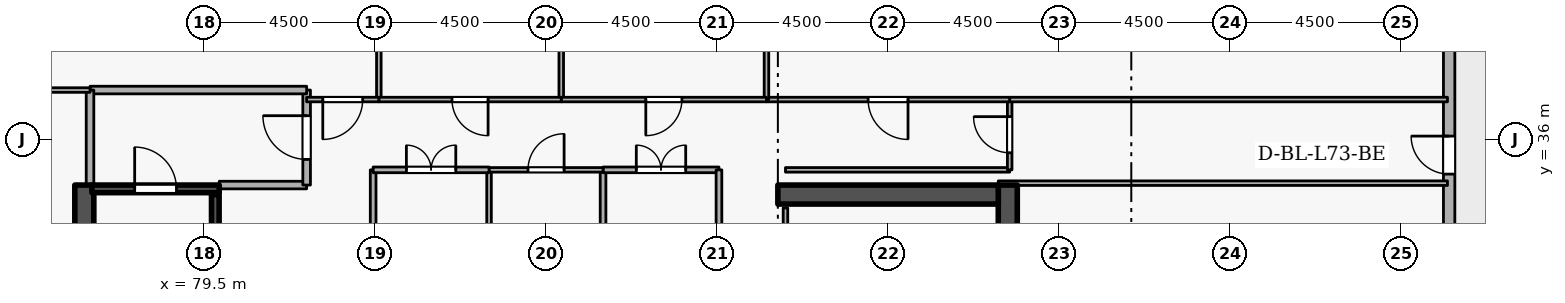
"""IFC4 building model, lengths in metres.
Left out: names, types, materials, properties, quantities, classifications, styles, units other than length and angle.
Written with IfcOpenShell. Run it as: python <this file> out.ifc"""

import sys

from ifc_helpers import new_model, si_unit, direction, frame, frame_2d, origin, place, context, subcontext, project, spatial, rectangle, extrude, element, fill, save


model = new_model("IFC4")
c1 = context("Model", 3, precision=1e-05, world=origin(), true_north=direction((0.0, 1.0)))
c2 = subcontext(c1, "Body", "Model", "MODEL_VIEW")
j1 = project(units=[si_unit("LENGTHUNIT", "METRE"), si_unit("PLANEANGLEUNIT", "RADIAN")], contexts=[c1])
p1 = place(None, origin())
s1 = spatial("IfcSite", under=j1, at=p1, CompositionType="ELEMENT")
p2 = place(p1, origin())
s2 = spatial("IfcBuilding", under=s1, at=p2, CompositionType="ELEMENT")
p3 = place(p2, frame((0.0, 0.0, 272.7)))
s3 = spatial("IfcBuildingStorey", under=s2, at=p3, CompositionType="ELEMENT", Elevation=272.7)
p4 = place(p3, frame((100.65, 19.2, 0.0), z_axis=(0.0, 0.0, 1.0), x_axis=(0.0, 1.0, 0.0)))
e1 = element("IfcWall", 1, at=p4, inside=s3, PredefinedType="SHEAR", context=c2, shape_type="SweptSolid", body=[
    extrude(rectangle(XDim=15.6, YDim=0.5, at=frame_2d((7.8, 0.0))), origin(), (0.0, 0.0, 1.0), 3.6),
])
p5 = place(p3, frame((94.6, 34.55, 0.0), z_axis=(0.0, 0.0, 1.0), x_axis=(1.0, 0.0, 0.0)))
e2 = element("IfcWall", 2, at=p5, inside=s3, PredefinedType="SHEAR", context=c2, shape_type="SweptSolid", body=[
    extrude(rectangle(XDim=5.8, YDim=0.5, at=frame_2d((2.9, 0.0))), origin(), (0.0, 0.0, 1.0), 3.6),
])
p6 = place(p3, frame((76.35, 19.2, 0.0), z_axis=(0.0, 0.0, 1.0), x_axis=(0.0, 1.0, 0.0)))
e3 = element("IfcWall", 3, at=p6, inside=s3, PredefinedType="SHEAR", context=c2, shape_type="SweptSolid", body=[
    extrude(rectangle(XDim=15.6, YDim=0.5, at=frame_2d((7.8, 0.0))), origin(), (0.0, 0.0, 1.0), 3.6),
])
p7 = place(p3, frame((112.264, 12.094, 0.0), z_axis=(0.0, 0.0, 1.0), x_axis=(2.7061402e-05, 0.999999999634, 0.0)))
e4 = element("IfcWall", 4, at=p7, inside=s3, PredefinedType="STANDARD", context=c2, shape_type="SweptSolid", body=[
    extrude(rectangle(XDim=36.087, YDim=0.3, at=frame_2d((18.043, 0.0))), origin(), (0.0, 0.0, 1.0), 2.7),
])
p8 = place(p7, frame((22.993, 0.0, 0.0)))
e5 = element("IfcOpeningElement", 5, at=p8, cuts=e4, PredefinedType="OPENING", context=c2, shape_type="SweptSolid", body=[
    extrude(rectangle(XDim=1.0, YDim=2.08, at=frame_2d((0.5, 1.04))), frame((0.0, 0.16, 0.0), z_axis=(0.0, -1.0, 0.0), x_axis=(1.0, 0.0, 0.0)), (0.0, 0.0, 1.0), 0.32),
])
p9 = place(p7, frame((2.7, 0.0, 0.72)))
e6 = element("IfcOpeningElement", 6, at=p9, cuts=e4, PredefinedType="OPENING", context=c2, shape_type="SweptSolid", body=[
    extrude(rectangle(XDim=0.9, YDim=1.75, at=frame_2d((0.45, 0.875))), frame((0.0, 0.16, 0.0), z_axis=(0.0, -1.0, 0.0), x_axis=(1.0, 0.0, 0.0)), (0.0, 0.0, 1.0), 0.32),
])
p10 = place(p7, frame((7.5, 0.0, 0.72)))
e7 = element("IfcOpeningElement", 7, at=p10, cuts=e4, PredefinedType="OPENING", context=c2, shape_type="SweptSolid", body=[
    extrude(rectangle(XDim=0.9, YDim=1.75, at=frame_2d((0.45, 0.875))), frame((0.0, 0.16, 0.0), z_axis=(0.0, -1.0, 0.0), x_axis=(1.0, 0.0, 0.0)), (0.0, 0.0, 1.0), 0.32),
])
p11 = place(p7, frame((12.3, 0.0, 0.72)))
e8 = element("IfcOpeningElement", 8, at=p11, cuts=e4, PredefinedType="OPENING", context=c2, shape_type="SweptSolid", body=[
    extrude(rectangle(XDim=0.9, YDim=1.75, at=frame_2d((0.45, 0.875))), frame((0.0, 0.16, 0.0), z_axis=(0.0, -1.0, 0.0), x_axis=(1.0, 0.0, 0.0)), (0.0, 0.0, 1.0), 0.32),
])
p12 = place(p7, frame((17.1, 0.0, 0.72)))
e9 = element("IfcOpeningElement", 9, at=p12, cuts=e4, PredefinedType="OPENING", context=c2, shape_type="SweptSolid", body=[
    extrude(rectangle(XDim=0.9, YDim=1.75, at=frame_2d((0.45, 0.875))), frame((0.0, 0.16, 0.0), z_axis=(0.0, -1.0, 0.0), x_axis=(1.0, 0.0, 0.0)), (0.0, 0.0, 1.0), 0.32),
])
p13 = place(p7, frame((26.7, 0.0, 0.72)))
e10 = element("IfcOpeningElement", 10, at=p13, cuts=e4, PredefinedType="OPENING", context=c2, shape_type="SweptSolid", body=[
    extrude(rectangle(XDim=0.9, YDim=1.75, at=frame_2d((0.45, 0.875))), frame((0.0, 0.16, 0.0), z_axis=(0.0, -1.0, 0.0), x_axis=(1.0, 0.0, 0.0)), (0.0, 0.0, 1.0), 0.32),
])
p14 = place(p7, frame((31.5, 0.0, 0.72)))
e11 = element("IfcOpeningElement", 11, at=p14, cuts=e4, PredefinedType="OPENING", context=c2, shape_type="SweptSolid", body=[
    extrude(rectangle(XDim=0.9, YDim=1.75, at=frame_2d((0.45, 0.875))), frame((0.0, 0.16, 0.0), z_axis=(0.0, -1.0, 0.0), x_axis=(1.0, 0.0, 0.0)), (0.0, 0.0, 1.0), 0.32),
])
p15 = place(p3, frame((76.55, 34.7, 0.0), z_axis=(0.0, 0.0, 1.0), x_axis=(1.0, 0.0, 0.0)))
e12 = element("IfcWall", 12, at=p15, inside=s3, PredefinedType="SHEAR", context=c2, shape_type="SweptSolid", body=[
    extrude(rectangle(XDim=3.35, YDim=0.2, at=frame_2d((1.675, 0.0))), origin(), (0.0, 0.0, 1.0), 3.6),
])
p16 = place(p15, frame((1.125, 0.0, 0.0)))
e13 = element("IfcOpeningElement", 13, at=p16, cuts=e12, PredefinedType="OPENING", context=c2, shape_type="SweptSolid", body=[
    extrude(rectangle(XDim=1.1, YDim=2.1, at=frame_2d((0.55, 1.05))), frame((0.0, 0.11, 0.0), z_axis=(0.0, -1.0, 0.0), x_axis=(1.0, 0.0, 0.0)), (0.0, 0.0, 1.0), 0.22),
])
p17 = place(p3, frame((79.797, 27.45, 0.0), z_axis=(0.0, 0.0, 1.0), x_axis=(0.0, 1.0, 0.0)))
e14 = element("IfcWall", 14, at=p17, inside=s3, PredefinedType="SHEAR", context=c2, shape_type="SweptSolid", body=[
    extrude(rectangle(XDim=7.1, YDim=0.2, at=frame_2d((3.55, 0.0))), origin(), (0.0, 0.0, 1.0), 3.6),
])
p18 = place(p3, frame((79.9, 34.8, 0.0), z_axis=(0.0, 0.0, 1.0), x_axis=(1.0, 0.0, 0.0)))
e15 = element("IfcWall", 15, at=p18, inside=s3, PredefinedType="STANDARD", context=c2, shape_type="SweptSolid", body=[
    extrude(rectangle(XDim=2.3, YDim=0.2, at=frame_2d((1.15, 0.0))), origin(), (0.0, 0.0, 1.0), 2.545),
])
p19 = place(p3, frame((82.2, 34.8, 0.0), z_axis=(0.0, 0.0, 1.0), x_axis=(0.0, 1.0, 0.0)))
e16 = element("IfcWall", 16, at=p19, inside=s3, PredefinedType="STANDARD", context=c2, shape_type="SweptSolid", body=[
    extrude(rectangle(XDim=2.5, YDim=0.2, at=frame_2d((1.25, 0.0))), origin(), (0.0, 0.0, 1.0), 3.34),
])
p20 = place(p19, frame((0.675, 0.0, 0.0)))
e17 = element("IfcOpeningElement", 17, at=p20, cuts=e16, PredefinedType="OPENING", context=c2, shape_type="SweptSolid", body=[
    extrude(rectangle(XDim=1.15, YDim=2.1, at=frame_2d((0.575, 1.05))), frame((0.0, 0.11, 0.0), z_axis=(0.0, -1.0, 0.0), x_axis=(1.0, 0.0, 0.0)), (0.0, 0.0, 1.0), 0.22),
])
p21 = place(p3, frame((82.2, 37.3, 0.0), z_axis=(0.0, 0.0, 1.0), x_axis=(-1.0, 0.0, 0.0)))
e18 = element("IfcWall", 18, at=p21, inside=s3, PredefinedType="STANDARD", context=c2, shape_type="SweptSolid", body=[
    extrude(rectangle(XDim=5.7, YDim=0.2, at=frame_2d((2.85, 0.0))), origin(), (0.0, 0.0, 1.0), 3.34),
])
p22 = place(p3, frame((76.5, 37.3, 0.0), z_axis=(0.0, 0.0, 1.0), x_axis=(0.0, -1.0, 0.0)))
e19 = element("IfcWall", 19, at=p22, inside=s3, PredefinedType="STANDARD", context=c2, shape_type="SweptSolid", body=[
    extrude(rectangle(XDim=2.5, YDim=0.2, at=frame_2d((1.25, 0.0))), origin(), (0.0, 0.0, 1.0), 3.34),
])
p23 = place(p3, frame((94.8, 32.1, 0.0), z_axis=(0.0, 0.0, 1.0), x_axis=(0.0, 1.0, 0.0)))
e20 = element("IfcWall", 20, at=p23, inside=s3, PredefinedType="PARTITIONING", context=c2, shape_type="SweptSolid", body=[
    extrude(rectangle(XDim=2.1, YDim=0.12, at=frame_2d((1.05, 0.0))), origin(), (0.0, 0.0, 1.0), 3.34),
])
p24 = place(p23, frame((0.575, 0.0, 0.0)))
e21 = element("IfcOpeningElement", 21, at=p24, cuts=e20, PredefinedType="OPENING", context=c2, shape_type="SweptSolid", body=[
    extrude(rectangle(XDim=0.95, YDim=2.1, at=frame_2d((0.475, 1.05))), frame((0.0, 0.07, 0.0), z_axis=(0.0, -1.0, 0.0), x_axis=(1.0, 0.0, 0.0)), (0.0, 0.0, 1.0), 0.14),
])
p25 = place(p3, frame((94.8, 35.2, 0.0), z_axis=(0.0, 0.0, 1.0), x_axis=(1.0, 0.0, 0.0)))
e22 = element("IfcWall", 22, at=p25, inside=s3, PredefinedType="PARTITIONING", context=c2, shape_type="SweptSolid", body=[
    extrude(rectangle(XDim=5.9, YDim=0.12, at=frame_2d((2.95, 0.0))), origin(), (0.0, 0.0, 1.0), 3.34),
])
p26 = place(p3, frame((100.7, 35.2, 0.0), z_axis=(0.0, 0.0, 1.0), x_axis=(0.0, 1.0, 0.0)))
e23 = element("IfcWall", 23, at=p26, inside=s3, PredefinedType="PARTITIONING", context=c2, shape_type="SweptSolid", body=[
    extrude(rectangle(XDim=1.85, YDim=0.12, at=frame_2d((0.925, 0.0))), origin(), (0.0, 0.0, 1.0), 3.34),
])
p27 = place(p26, frame((0.45, 0.0, 0.0)))
e24 = element("IfcOpeningElement", 24, at=p27, cuts=e23, PredefinedType="OPENING", context=c2, shape_type="SweptSolid", body=[
    extrude(rectangle(XDim=0.95, YDim=2.1, at=frame_2d((0.475, 1.05))), frame((0.0, 0.07, 0.0), z_axis=(0.0, -1.0, 0.0), x_axis=(1.0, 0.0, 0.0)), (0.0, 0.0, 1.0), 0.14),
])
p28 = place(p3, frame((100.7, 37.05, 0.0), z_axis=(0.0, 0.0, 1.0), x_axis=(1.0, 0.0, 0.0)))
e25 = element("IfcWall", 25, at=p28, inside=s3, PredefinedType="PARTITIONING", context=c2, shape_type="SweptSolid", body=[
    extrude(rectangle(XDim=11.52, YDim=0.12, at=frame_2d((5.76, 0.0))), origin(), (0.0, 0.0, 1.0), 3.34),
])
p29 = place(p3, frame((112.22, 34.85, 0.0), z_axis=(0.0, 0.0, 1.0), x_axis=(-1.0, 0.0, 0.0)))
e26 = element("IfcWall", 26, at=p29, inside=s3, PredefinedType="PARTITIONING", context=c2, shape_type="SweptSolid", body=[
    extrude(rectangle(XDim=11.82, YDim=0.12, at=frame_2d((5.91, 0.0))), origin(), (0.0, 0.0, 1.0), 2.545),
])
p30 = place(p3, frame((100.7, 37.05, 0.0), z_axis=(0.0, 0.0, 1.0), x_axis=(-1.0, 0.0, 0.0)))
e27 = element("IfcWall", 27, at=p30, inside=s3, PredefinedType="PARTITIONING", context=c2, shape_type="SweptSolid", body=[
    extrude(rectangle(XDim=6.4, YDim=0.12, at=frame_2d((3.2, 0.0))), origin(), (0.0, 0.0, 1.0), 3.34),
])
p31 = place(p30, frame((2.675, 0.0, 0.0)))
e28 = element("IfcOpeningElement", 28, at=p31, cuts=e27, PredefinedType="OPENING", context=c2, shape_type="SweptSolid", body=[
    extrude(rectangle(XDim=1.05, YDim=2.1, at=frame_2d((0.525, 1.05))), frame((0.0, 0.07, 0.0), z_axis=(0.0, -1.0, 0.0), x_axis=(1.0, 0.0, 0.0)), (0.0, 0.0, 1.0), 0.14),
])
for number, where, z_axis, x_axis in (
    (29, (94.3, 37.05, 0.0), (0.0, 0.0, 1.0), (0.0, 1.0, 0.0)),
    (30, (88.9, 37.05, 0.0), (0.0, 0.0, 1.0), (0.0, 1.0, 0.0)),
):
    element("IfcWall", number, at=place(p3, frame(where, z_axis=z_axis, x_axis=x_axis)), inside=s3, PredefinedType="PARTITIONING", context=c2, shape_type="SweptSolid", body=[
        extrude(rectangle(XDim=13.67, YDim=0.12, at=frame_2d((6.835, 0.0))), origin(), (0.0, 0.0, 1.0), 3.34),
    ])
p32 = place(p3, frame((94.3, 37.05, 0.0), z_axis=(0.0, 0.0, 1.0), x_axis=(-1.0, 0.0, 0.0)))
e31 = element("IfcWall", 31, at=p32, inside=s3, PredefinedType="PARTITIONING", context=c2, shape_type="SweptSolid", body=[
    extrude(rectangle(XDim=5.4, YDim=0.12, at=frame_2d((2.7, 0.0))), origin(), (0.0, 0.0, 1.0), 3.34),
])
p33 = place(p32, frame((2.225, 0.0, 0.0)))
e32 = element("IfcOpeningElement", 32, at=p33, cuts=e31, PredefinedType="OPENING", context=c2, shape_type="SweptSolid", body=[
    extrude(rectangle(XDim=0.95, YDim=2.1, at=frame_2d((0.475, 1.05))), frame((0.0, 0.07, 0.0), z_axis=(0.0, -1.0, 0.0), x_axis=(1.0, 0.0, 0.0)), (0.0, 0.0, 1.0), 0.14),
])
p34 = place(p3, frame((84.1, 37.05, 0.0), z_axis=(0.0, 0.0, 1.0), x_axis=(0.0, 1.0, 0.0)))
e33 = element("IfcWall", 33, at=p34, inside=s3, PredefinedType="PARTITIONING", context=c2, shape_type="SweptSolid", body=[
    extrude(rectangle(XDim=13.67, YDim=0.12, at=frame_2d((6.835, 0.0))), origin(), (0.0, 0.0, 1.0), 3.34),
])
p35 = place(p3, frame((88.9, 37.05, 0.0), z_axis=(0.0, 0.0, 1.0), x_axis=(-1.0, 0.0, 0.0)))
e34 = element("IfcWall", 34, at=p35, inside=s3, PredefinedType="PARTITIONING", context=c2, shape_type="SweptSolid", body=[
    extrude(rectangle(XDim=4.8, YDim=0.12, at=frame_2d((2.4, 0.0))), origin(), (0.0, 0.0, 1.0), 3.34),
])
p36 = place(p35, frame((1.925, 0.0, 0.0)))
e35 = element("IfcOpeningElement", 35, at=p36, cuts=e34, PredefinedType="OPENING", context=c2, shape_type="SweptSolid", body=[
    extrude(rectangle(XDim=0.95, YDim=2.1, at=frame_2d((0.475, 1.05))), frame((0.0, 0.07, 0.0), z_axis=(0.0, -1.0, 0.0), x_axis=(1.0, 0.0, 0.0)), (0.0, 0.0, 1.0), 0.14),
])
p37 = place(p3, frame((76.5, 37.3, 0.0), z_axis=(0.0, 0.0, 1.0), x_axis=(-1.0, 0.0, 0.0)))
e36 = element("IfcWall", 36, at=p37, inside=s3, PredefinedType="PARTITIONING", context=c2, shape_type="SweptSolid", body=[
    extrude(rectangle(XDim=5.72, YDim=0.12, at=frame_2d((2.86, 0.0))), origin(), (0.0, 0.0, 1.0), 3.34),
])
p38 = place(p3, frame((84.1, 37.05, 0.0), z_axis=(0.0, 0.0, 1.0), x_axis=(-1.0, 0.0, 0.0)))
e37 = element("IfcWall", 37, at=p38, inside=s3, PredefinedType="PARTITIONING", context=c2, shape_type="SweptSolid", body=[
    extrude(rectangle(XDim=1.9, YDim=0.12, at=frame_2d((0.95, 0.0))), origin(), (0.0, 0.0, 1.0), 3.34),
])
p39 = place(p38, frame((0.425, 0.0, 0.0)))
e38 = element("IfcOpeningElement", 38, at=p39, cuts=e37, PredefinedType="OPENING", context=c2, shape_type="SweptSolid", body=[
    extrude(rectangle(XDim=1.05, YDim=2.1, at=frame_2d((0.525, 1.05))), frame((0.0, 0.07, 0.0), z_axis=(0.0, -1.0, 0.0), x_axis=(1.0, 0.0, 0.0)), (0.0, 0.0, 1.0), 0.14),
])
p40 = place(p3, frame((90.0, 32.2, 0.0), z_axis=(0.0, 0.0, 1.0), x_axis=(0.0, 1.0, 0.0)))
e39 = element("IfcWall", 39, at=p40, inside=s3, PredefinedType="PARTITIONING", context=c2, shape_type="SweptSolid", body=[
    extrude(rectangle(XDim=3.0, YDim=0.15, at=frame_2d((1.5, 0.0))), origin(), (0.0, 0.0, 1.0), 3.34),
])
p41 = place(p3, frame((90.0, 35.2, 0.0), z_axis=(0.0, 0.0, 1.0), x_axis=(1.0, 0.0, 0.0)))
e40 = element("IfcWall", 40, at=p41, inside=s3, PredefinedType="PARTITIONING", context=c2, shape_type="SweptSolid", body=[
    extrude(rectangle(XDim=3.05, YDim=0.15, at=frame_2d((1.525, 0.0))), origin(), (0.0, 0.0, 1.0), 3.34),
])
p42 = place(p41, frame((0.875, 0.0, 0.0)))
e41 = element("IfcOpeningElement", 41, at=p42, cuts=e40, PredefinedType="OPENING", context=c2, shape_type="SweptSolid", body=[
    extrude(rectangle(XDim=1.3, YDim=2.12, at=frame_2d((0.65, 1.06))), frame((0.0, 0.085, 0.0), z_axis=(0.0, -1.0, 0.0), x_axis=(1.0, 0.0, 0.0)), (0.0, 0.0, 1.0), 0.17),
])
p43 = place(p3, frame((93.05, 35.2, 0.0), z_axis=(0.0, 0.0, 1.0), x_axis=(0.0, -1.0, 0.0)))
e42 = element("IfcWall", 42, at=p43, inside=s3, PredefinedType="PARTITIONING", context=c2, shape_type="SweptSolid", body=[
    extrude(rectangle(XDim=3.0, YDim=0.15, at=frame_2d((1.5, 0.0))), origin(), (0.0, 0.0, 1.0), 3.34),
])
p44 = place(p3, frame((87.0, 32.2, 0.0), z_axis=(0.0, 0.0, 1.0), x_axis=(0.0, 1.0, 0.0)))
e43 = element("IfcWall", 43, at=p44, inside=s3, PredefinedType="PARTITIONING", context=c2, shape_type="SweptSolid", body=[
    extrude(rectangle(XDim=3.0, YDim=0.12, at=frame_2d((1.5, 0.0))), origin(), (0.0, 0.0, 1.0), 3.34),
])
p45 = place(p3, frame((87.0, 35.2, 0.0), z_axis=(0.0, 0.0, 1.0), x_axis=(1.0, 0.0, 0.0)))
e44 = element("IfcWall", 44, at=p45, inside=s3, PredefinedType="PARTITIONING", context=c2, shape_type="SweptSolid", body=[
    extrude(rectangle(XDim=3.0, YDim=0.12, at=frame_2d((1.5, 0.0))), origin(), (0.0, 0.0, 1.0), 3.34),
])
p46 = place(p45, frame((1.025, 0.0, 0.0)))
e45 = element("IfcOpeningElement", 45, at=p46, cuts=e44, PredefinedType="OPENING", context=c2, shape_type="SweptSolid", body=[
    extrude(rectangle(XDim=0.95, YDim=2.1, at=frame_2d((0.475, 1.05))), frame((0.0, 0.07, 0.0), z_axis=(0.0, -1.0, 0.0), x_axis=(1.0, 0.0, 0.0)), (0.0, 0.0, 1.0), 0.14),
])
p47 = place(p3, frame((83.95, 32.2, 0.0), z_axis=(0.0, 0.0, 1.0), x_axis=(0.0, 1.0, 0.0)))
e46 = element("IfcWall", 46, at=p47, inside=s3, PredefinedType="PARTITIONING", context=c2, shape_type="SweptSolid", body=[
    extrude(rectangle(XDim=3.0, YDim=0.15, at=frame_2d((1.5, 0.0))), origin(), (0.0, 0.0, 1.0), 3.34),
])
p48 = place(p3, frame((83.95, 35.2, 0.0), z_axis=(0.0, 0.0, 1.0), x_axis=(1.0, 0.0, 0.0)))
e47 = element("IfcWall", 47, at=p48, inside=s3, PredefinedType="PARTITIONING", context=c2, shape_type="SweptSolid", body=[
    extrude(rectangle(XDim=3.05, YDim=0.15, at=frame_2d((1.525, 0.0))), origin(), (0.0, 0.0, 1.0), 3.34),
])
p49 = place(p48, frame((0.875, 0.0, 0.0)))
e48 = element("IfcOpeningElement", 48, at=p49, cuts=e47, PredefinedType="OPENING", context=c2, shape_type="SweptSolid", body=[
    extrude(rectangle(XDim=1.3, YDim=2.12, at=frame_2d((0.65, 1.06))), frame((0.0, 0.085, 0.0), z_axis=(0.0, -1.0, 0.0), x_axis=(1.0, 0.0, 0.0)), (0.0, 0.0, 1.0), 0.17),
])
p50 = place(p8, origin())
e49 = element("IfcDoor", 49, at=p50, inside=s3, OperationType="SINGLE_SWING_RIGHT", PredefinedType="DOOR", context=c2, shape_type="SweptSolid", body=[
    extrude(rectangle(XDim=1.0, YDim=2.08, at=frame_2d((0.5, 1.04))), frame((0.0, 0.025, 0.0), z_axis=(0.0, -1.0, 0.0), x_axis=(1.0, 0.0, 0.0)), (0.0, 0.0, 1.0), 0.05),
])
fill(e5, e49)
p51 = place(p16, origin())
e50 = element("IfcDoor", 50, at=p51, inside=s3, OperationType="SINGLE_SWING_LEFT", PredefinedType="DOOR", context=c2, shape_type="SweptSolid", body=[
    extrude(rectangle(XDim=1.1, YDim=2.1, at=frame_2d((0.55, 1.05))), frame((0.0, 0.025, 0.0), z_axis=(0.0, -1.0, 0.0), x_axis=(1.0, 0.0, 0.0)), (0.0, 0.0, 1.0), 0.05),
])
fill(e13, e50)
p52 = place(p20, origin())
e51 = element("IfcDoor", 51, at=p52, inside=s3, OperationType="SINGLE_SWING_RIGHT", PredefinedType="DOOR", context=c2, shape_type="SweptSolid", body=[
    extrude(rectangle(XDim=1.15, YDim=2.1, at=frame_2d((0.575, 1.05))), frame((0.0, 0.025, 0.0), z_axis=(0.0, -1.0, 0.0), x_axis=(1.0, 0.0, 0.0)), (0.0, 0.0, 1.0), 0.05),
])
fill(e17, e51)
p53 = place(p27, origin())
e52 = element("IfcDoor", 52, at=p53, inside=s3, OperationType="SINGLE_SWING_RIGHT", PredefinedType="DOOR", context=c2, shape_type="SweptSolid", body=[
    extrude(rectangle(XDim=0.95, YDim=2.1, at=frame_2d((0.475, 1.05))), frame((0.0, 0.025, 0.0), z_axis=(0.0, -1.0, 0.0), x_axis=(1.0, 0.0, 0.0)), (0.0, 0.0, 1.0), 0.05),
])
fill(e24, e52)
p54 = place(p31, origin())
e53 = element("IfcDoor", 53, at=p54, inside=s3, OperationType="SINGLE_SWING_LEFT", PredefinedType="DOOR", context=c2, shape_type="SweptSolid", body=[
    extrude(rectangle(XDim=1.05, YDim=2.1, at=frame_2d((0.525, 1.05))), frame((0.0, 0.025, 0.0), z_axis=(0.0, -1.0, 0.0), x_axis=(1.0, 0.0, 0.0)), (0.0, 0.0, 1.0), 0.05),
])
fill(e28, e53)
p55 = place(p33, origin())
e54 = element("IfcDoor", 54, at=p55, inside=s3, OperationType="SINGLE_SWING_RIGHT", PredefinedType="DOOR", context=c2, shape_type="SweptSolid", body=[
    extrude(rectangle(XDim=0.95, YDim=2.1, at=frame_2d((0.475, 1.05))), frame((0.0, 0.025, 0.0), z_axis=(0.0, -1.0, 0.0), x_axis=(1.0, 0.0, 0.0)), (0.0, 0.0, 1.0), 0.05),
])
fill(e32, e54)
p56 = place(p36, origin())
e55 = element("IfcDoor", 55, at=p56, inside=s3, OperationType="SINGLE_SWING_LEFT", PredefinedType="DOOR", context=c2, shape_type="SweptSolid", body=[
    extrude(rectangle(XDim=0.95, YDim=2.1, at=frame_2d((0.475, 1.05))), frame((0.0, 0.025, 0.0), z_axis=(0.0, -1.0, 0.0), x_axis=(1.0, 0.0, 0.0)), (0.0, 0.0, 1.0), 0.05),
])
fill(e35, e55)
p57 = place(p39, origin())
e56 = element("IfcDoor", 56, at=p57, inside=s3, OperationType="SINGLE_SWING_RIGHT", PredefinedType="DOOR", context=c2, shape_type="SweptSolid", body=[
    extrude(rectangle(XDim=1.05, YDim=2.1, at=frame_2d((0.525, 1.05))), frame((0.0, 0.025, 0.0), z_axis=(0.0, -1.0, 0.0), x_axis=(1.0, 0.0, 0.0)), (0.0, 0.0, 1.0), 0.05),
])
fill(e38, e56)
p58 = place(p42, origin())
e57 = element("IfcDoor", 57, at=p58, inside=s3, OperationType="DOUBLE_DOOR_SINGLE_SWING", PredefinedType="DOOR", context=c2, shape_type="SweptSolid", body=[
    extrude(rectangle(XDim=1.3, YDim=2.12, at=frame_2d((0.65, 1.06))), frame((0.0, 0.025, 0.0), z_axis=(0.0, -1.0, 0.0), x_axis=(1.0, 0.0, 0.0)), (0.0, 0.0, 1.0), 0.05),
])
fill(e41, e57)
p59 = place(p46, origin())
e58 = element("IfcDoor", 58, at=p59, inside=s3, OperationType="SINGLE_SWING_RIGHT", PredefinedType="DOOR", context=c2, shape_type="SweptSolid", body=[
    extrude(rectangle(XDim=0.95, YDim=2.1, at=frame_2d((0.475, 1.05))), frame((0.0, 0.025, 0.0), z_axis=(0.0, -1.0, 0.0), x_axis=(1.0, 0.0, 0.0)), (0.0, 0.0, 1.0), 0.05),
])
fill(e45, e58)
p60 = place(p49, origin())
e59 = element("IfcDoor", 59, at=p60, inside=s3, OperationType="DOUBLE_DOOR_SINGLE_SWING", PredefinedType="DOOR", context=c2, shape_type="SweptSolid", body=[
    extrude(rectangle(XDim=1.3, YDim=2.12, at=frame_2d((0.65, 1.06))), frame((0.0, 0.025, 0.0), z_axis=(0.0, -1.0, 0.0), x_axis=(1.0, 0.0, 0.0)), (0.0, 0.0, 1.0), 0.05),
])
fill(e48, e59)
save(model, sys.argv[1])
